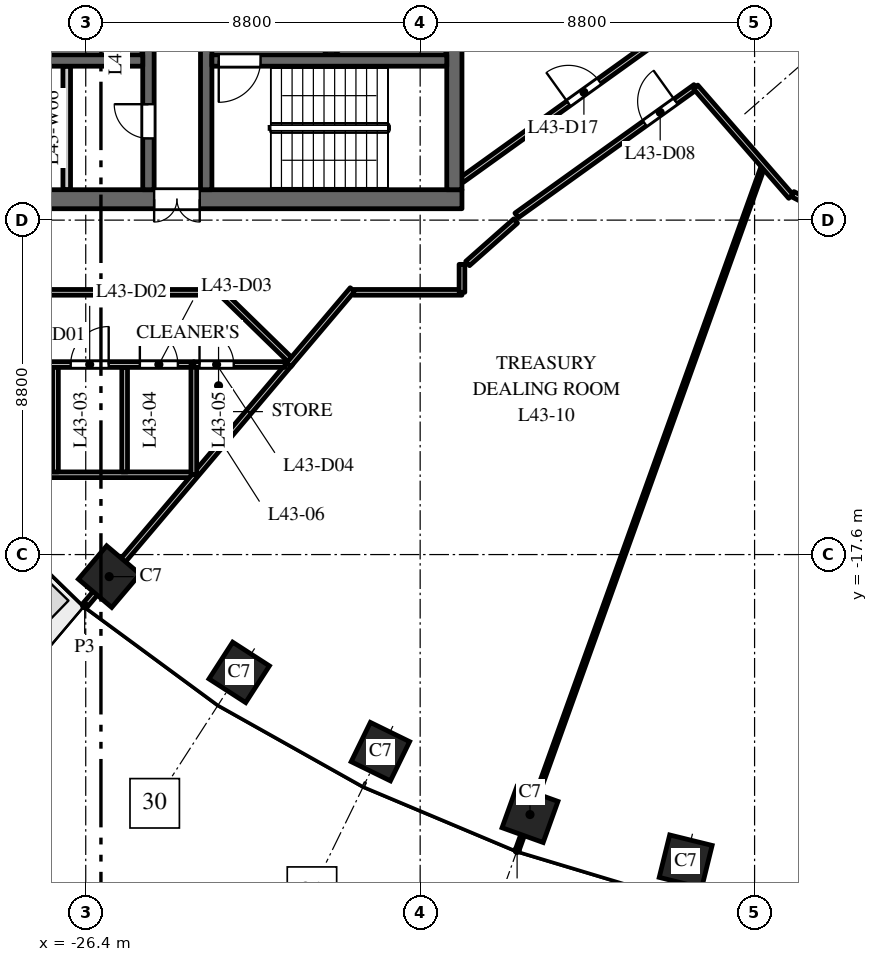
"""IFC4 building model, lengths in metres.
Left out: names, types, materials, properties, quantities, classifications, styles, units other than length and angle.
Written with IfcOpenShell. Run it as: python <this file> out.ifc"""

import sys

from ifc_helpers import new_model, si_unit, direction, frame, frame_2d, origin, origin_2d, place, context, subcontext, project, spatial, rectangle, extrude, element, fill, save


model = new_model("IFC4")
c1 = context("Model", 3, precision=1e-05, world=origin(), true_north=direction((0.0, 1.0)))
c2 = subcontext(c1, "Body", "Model", "MODEL_VIEW")
j1 = project(units=[si_unit("LENGTHUNIT", "METRE"), si_unit("PLANEANGLEUNIT", "RADIAN")], contexts=[c1])
p1 = place(None, origin())
s1 = spatial("IfcSite", under=j1, at=p1, CompositionType="ELEMENT")
p2 = place(p1, origin())
s2 = spatial("IfcBuilding", under=s1, at=p2, CompositionType="ELEMENT")
p3 = place(p2, frame((0.0, 0.0, 186.0)))
s3 = spatial("IfcBuildingStorey", under=s2, at=p3, CompositionType="ELEMENT", Elevation=186.0)
for number, where, z_axis, x_axis in (
    (1, (-25.783, -18.18, 0.0), (0.0, 0.0, 1.0), (0.763, -0.646, 0.0)),
    (2, (-22.362, -20.7, 0.0), (0.0, 0.0, 1.0), (0.84, -0.542, 0.0)),
    (3, (-18.646, -22.785, 0.0), (0.0, 0.0, 1.0), (0.898, -0.439, 0.0)),
    (4, (-14.709, -24.441, 0.0), (0.0, 0.0, 1.0), (0.941, -0.338, 0.0)),
    (5, (-10.613, -25.674, 0.0), (0.0, 0.0, 1.0), (0.971, -0.24, 0.0)),
):
    element("IfcColumn", number, at=place(p3, frame(where, z_axis=z_axis, x_axis=x_axis)), inside=s3, PredefinedType="COLUMN", context=c2, shape_type="SweptSolid", body=[
        extrude(rectangle(XDim=1.15, YDim=1.15, at=origin_2d()), origin(), (0.0, 0.0, 1.0), 4.0),
    ])
p4 = place(p3, frame((-16.5, -8.25, 0.0), z_axis=(0.0, 0.0, 1.0), x_axis=(-1.0, 0.0, 0.0)))
e6 = element("IfcWall", 6, at=p4, inside=s3, PredefinedType="SHEAR", context=c2, shape_type="SweptSolid", body=[
    extrude(rectangle(XDim=15.0, YDim=0.5, at=frame_2d((7.5, 0.0))), origin(), (0.0, 0.0, 1.0), 3.7),
])
p5 = place(p4, frame((6.9, 0.0, 0.0)))
e7 = element("IfcOpeningElement", 7, at=p5, cuts=e6, PredefinedType="OPENING", context=c2, shape_type="SweptSolid", body=[
    extrude(rectangle(XDim=1.2, YDim=2.1, at=frame_2d((0.6, 1.05))), frame((0.0, 0.26, 0.0), z_axis=(0.0, -1.0, 0.0), x_axis=(1.0, 0.0, 0.0)), (0.0, 0.0, 1.0), 0.52),
])
p6 = place(p4, frame((12.05, 0.0, 0.0)))
e8 = element("IfcOpeningElement", 8, at=p6, cuts=e6, PredefinedType="OPENING", context=c2, shape_type="SweptSolid", body=[
    extrude(rectangle(XDim=0.9, YDim=2.1, at=frame_2d((0.45, 1.05))), frame((0.0, 0.26, 0.0), z_axis=(0.0, -1.0, 0.0), x_axis=(1.0, 0.0, 0.0)), (0.0, 0.0, 1.0), 0.52),
])
p7 = place(p3, frame((-19.95, -4.45, 0.0), z_axis=(0.0, 0.0, 1.0), x_axis=(0.0, 1.0, 0.0)))
e9 = element("IfcWall", 9, at=p7, inside=s3, PredefinedType="SHEAR", context=c2, shape_type="SweptSolid", body=[
    extrude(rectangle(XDim=8.9, YDim=0.3, at=frame_2d((4.45, 0.0))), origin(), (0.0, 0.0, 1.0), 3.7),
])
p8 = place(p7, frame((0.775, 0.0, 0.0)))
e10 = element("IfcOpeningElement", 10, at=p8, cuts=e9, PredefinedType="OPENING", context=c2, shape_type="SweptSolid", body=[
    extrude(rectangle(XDim=1.2, YDim=2.1, at=frame_2d((0.6, 1.05))), frame((0.0, 0.16, 0.0), z_axis=(0.0, -1.0, 0.0), x_axis=(1.0, 0.0, 0.0)), (0.0, 0.0, 1.0), 0.32),
])
p9 = place(p7, frame((7.25, 0.0, 0.0)))
e11 = element("IfcOpeningElement", 11, at=p9, cuts=e9, PredefinedType="OPENING", context=c2, shape_type="SweptSolid", body=[
    extrude(rectangle(XDim=1.1, YDim=2.1, at=frame_2d((0.55, 1.05))), frame((0.0, 0.16, 0.0), z_axis=(0.0, -1.0, 0.0), x_axis=(1.0, 0.0, 0.0)), (0.0, 0.0, 1.0), 0.32),
])
p10 = place(p3, frame((-24.75, -8.0, 0.0), z_axis=(0.0, 0.0, 1.0), x_axis=(0.0, 1.0, 0.0)))
e12 = element("IfcWall", 12, at=p10, inside=s3, PredefinedType="SHEAR", context=c2, shape_type="SweptSolid", body=[
    extrude(rectangle(XDim=16.0, YDim=0.3, at=frame_2d((8.0, 0.0))), origin(), (0.0, 0.0, 1.0), 3.7),
])
p11 = place(p10, frame((4.425, 0.0, 0.0)))
e13 = element("IfcOpeningElement", 13, at=p11, cuts=e12, PredefinedType="OPENING", context=c2, shape_type="SweptSolid", body=[
    extrude(rectangle(XDim=1.1, YDim=2.1, at=frame_2d((0.55, 1.05))), frame((0.0, 0.16, 0.0), z_axis=(0.0, -1.0, 0.0), x_axis=(1.0, 0.0, 0.0)), (0.0, 0.0, 1.0), 0.32),
])
p12 = place(p10, frame((7.45, 0.0, 0.0)))
e14 = element("IfcOpeningElement", 14, at=p12, cuts=e12, PredefinedType="OPENING", context=c2, shape_type="SweptSolid", body=[
    extrude(rectangle(XDim=1.1, YDim=2.1, at=frame_2d((0.55, 1.05))), frame((0.0, 0.16, 0.0), z_axis=(0.0, -1.0, 0.0), x_axis=(1.0, 0.0, 0.0)), (0.0, 0.0, 1.0), 0.32),
])
p13 = place(p10, frame((10.475, 0.0, 0.0)))
e15 = element("IfcOpeningElement", 15, at=p13, cuts=e12, PredefinedType="OPENING", context=c2, shape_type="SweptSolid", body=[
    extrude(rectangle(XDim=1.1, YDim=2.1, at=frame_2d((0.55, 1.05))), frame((0.0, 0.16, 0.0), z_axis=(0.0, -1.0, 0.0), x_axis=(1.0, 0.0, 0.0)), (0.0, 0.0, 1.0), 0.32),
])
p14 = place(p10, frame((13.75, 0.0, 0.0)))
e16 = element("IfcOpeningElement", 16, at=p14, cuts=e12, PredefinedType="OPENING", context=c2, shape_type="SweptSolid", body=[
    extrude(rectangle(XDim=0.9, YDim=2.1, at=frame_2d((0.45, 1.05))), frame((0.0, 0.16, 0.0), z_axis=(0.0, -1.0, 0.0), x_axis=(1.0, 0.0, 0.0)), (0.0, 0.0, 1.0), 0.32),
])
p15 = place(p10, frame((1.35, 0.0, 0.0)))
e17 = element("IfcOpeningElement", 17, at=p15, cuts=e12, PredefinedType="OPENING", context=c2, shape_type="SweptSolid", body=[
    extrude(rectangle(XDim=0.9, YDim=2.1, at=frame_2d((0.45, 1.05))), frame((0.0, 0.16, 0.0), z_axis=(0.0, -1.0, 0.0), x_axis=(1.0, 0.0, 0.0)), (0.0, 0.0, 1.0), 0.32),
])
p16 = place(p3, frame((-16.7, -8.0, 0.0), z_axis=(0.0, 0.0, 1.0), x_axis=(0.0, 1.0, 0.0)))
e18 = element("IfcWall", 18, at=p16, inside=s3, PredefinedType="SHEAR", context=c2, shape_type="SweptSolid", body=[
    extrude(rectangle(XDim=16.0, YDim=0.4, at=frame_2d((8.0, 0.0))), origin(), (0.0, 0.0, 1.0), 3.7),
])
p17 = place(p3, frame((-26.9, -8.0, 0.0), z_axis=(0.0, 0.0, 1.0), x_axis=(0.0, 1.0, 0.0)))
e19 = element("IfcWall", 19, at=p17, inside=s3, PredefinedType="PARTITIONING", context=c2, shape_type="SweptSolid", body=[
    extrude(rectangle(XDim=3.25, YDim=0.2, at=frame_2d((1.625, 0.0))), origin(), (0.0, 0.0, 1.0), 3.7),
])
p18 = place(p3, frame((-24.9, -4.6, 0.0), z_axis=(0.0, 0.0, 1.0), x_axis=(-1.0, 0.0, 0.0)))
e20 = element("IfcWall", 20, at=p18, inside=s3, PredefinedType="SHEAR", context=c2, shape_type="SweptSolid", body=[
    extrude(rectangle(XDim=6.1, YDim=0.3, at=frame_2d((3.05, 0.0))), origin(), (0.0, 0.0, 1.0), 3.7),
])
p19 = place(p3, frame((-23.23, -8.0, 0.0), z_axis=(0.0, 0.0, 1.0), x_axis=(0.0, 1.0, 0.0)))
e21 = element("IfcWall", 21, at=p19, inside=s3, PredefinedType="SHEAR", context=c2, shape_type="SweptSolid", body=[
    extrude(rectangle(XDim=7.875, YDim=0.3, at=frame_2d((3.938, 0.0))), origin(), (0.0, 0.0, 1.0), 3.7),
])
p20 = place(p19, frame((5.15, 0.0, 0.0)))
e22 = element("IfcOpeningElement", 22, at=p20, cuts=e21, PredefinedType="OPENING", context=c2, shape_type="SweptSolid", body=[
    extrude(rectangle(XDim=1.1, YDim=2.1, at=frame_2d((0.55, 1.05))), frame((0.0, 0.16, 0.0), z_axis=(0.0, -1.0, 0.0), x_axis=(1.0, 0.0, 0.0)), (0.0, 0.0, 1.0), 0.32),
])
p21 = place(p3, frame((-16.9, -4.6, 0.0), z_axis=(0.0, 0.0, 1.0), x_axis=(-1.0, 0.0, 0.0)))
e23 = element("IfcWall", 23, at=p21, inside=s3, PredefinedType="SHEAR", context=c2, shape_type="SweptSolid", body=[
    extrude(rectangle(XDim=6.18, YDim=0.3, at=frame_2d((3.09, 0.0))), origin(), (0.0, 0.0, 1.0), 3.7),
])
p22 = place(p21, frame((4.9, 0.0, 0.0)))
e24 = element("IfcOpeningElement", 24, at=p22, cuts=e23, PredefinedType="OPENING", context=c2, shape_type="SweptSolid", body=[
    extrude(rectangle(XDim=1.1, YDim=2.1, at=frame_2d((0.55, 1.05))), frame((0.0, 0.16, 0.0), z_axis=(0.0, -1.0, 0.0), x_axis=(1.0, 0.0, 0.0)), (0.0, 0.0, 1.0), 0.32),
])
p23 = place(p3, frame((-31.5, -10.7, 0.0), z_axis=(0.0, 0.0, 1.0), x_axis=(1.0, 0.0, 0.0)))
e25 = element("IfcWall", 25, at=p23, inside=s3, PredefinedType="PARTITIONING", context=c2, shape_type="SweptSolid", body=[
    extrude(rectangle(XDim=8.762, YDim=0.15, at=frame_2d((4.381, 0.0))), origin(), (0.0, 0.0, 1.0), 3.1),
])
p24 = place(p3, frame((-29.016, -12.6, 0.0), z_axis=(0.0, 0.0, 1.0), x_axis=(1.0, 0.0, 0.0)))
e26 = element("IfcWall", 26, at=p24, inside=s3, PredefinedType="PARTITIONING", context=c2, shape_type="SweptSolid", body=[
    extrude(rectangle(XDim=5.46, YDim=0.15, at=frame_2d((2.73, 0.0))), origin(), (0.0, 0.0, 1.0), 3.7),
])
p25 = place(p24, frame((0.4, 0.0, 0.0)))
e27 = element("IfcOpeningElement", 27, at=p25, cuts=e26, PredefinedType="OPENING", context=c2, shape_type="SweptSolid", body=[
    extrude(rectangle(XDim=1.0, YDim=2.1, at=frame_2d((0.5, 1.05))), frame((0.0, 0.085, 0.0), z_axis=(0.0, -1.0, 0.0), x_axis=(1.0, 0.0, 0.0)), (0.0, 0.0, 1.0), 0.17),
])
p26 = place(p24, frame((2.22, 0.0, 0.0)))
e28 = element("IfcOpeningElement", 28, at=p26, cuts=e26, PredefinedType="OPENING", context=c2, shape_type="SweptSolid", body=[
    extrude(rectangle(XDim=1.0, YDim=2.1, at=frame_2d((0.5, 1.05))), frame((0.0, 0.085, 0.0), z_axis=(0.0, -1.0, 0.0), x_axis=(1.0, 0.0, 0.0)), (0.0, 0.0, 1.0), 0.17),
])
p27 = place(p24, frame((4.04, 0.0, 0.0)))
e29 = element("IfcOpeningElement", 29, at=p27, cuts=e26, PredefinedType="OPENING", context=c2, shape_type="SweptSolid", body=[
    extrude(rectangle(XDim=1.0, YDim=2.1, at=frame_2d((0.5, 1.05))), frame((0.0, 0.085, 0.0), z_axis=(0.0, -1.0, 0.0), x_axis=(1.0, 0.0, 0.0)), (0.0, 0.0, 1.0), 0.17),
])
p28 = place(p3, frame((-29.012, -15.5, 0.0), z_axis=(0.0, 0.0, 1.0), x_axis=(1.0, 0.0, 0.0)))
e30 = element("IfcWall", 30, at=p28, inside=s3, PredefinedType="PARTITIONING", context=c2, shape_type="SweptSolid", body=[
    extrude(rectangle(XDim=5.456, YDim=0.15, at=frame_2d((2.728, 0.0))), origin(), (0.0, 0.0, 1.0), 2.9),
])
p29 = place(p3, frame((-27.196, -15.425, 0.0), z_axis=(0.0, 0.0, 1.0), x_axis=(0.0, 1.0, 0.0)))
e31 = element("IfcWall", 31, at=p29, inside=s3, PredefinedType="PARTITIONING", context=c2, shape_type="SweptSolid", body=[
    extrude(rectangle(XDim=2.75, YDim=0.15, at=frame_2d((1.375, 0.0))), origin(), (0.0, 0.0, 1.0), 3.7),
])
p30 = place(p3, frame((-26.428, -18.946, 0.0), z_axis=(0.0, 0.0, 1.0), x_axis=(0.646259235329, 0.763117946816, 0.0)))
e32 = element("IfcWall", 32, at=p30, inside=s3, PredefinedType="PARTITIONING", context=c2, shape_type="SweptSolid", body=[
    extrude(rectangle(XDim=8.388, YDim=0.15, at=frame_2d((4.194, 0.0))), origin(), (0.0, 0.0, 1.0), 2.75),
])
p31 = place(p3, frame((-25.376, -15.425, 0.0), z_axis=(0.0, 0.0, 1.0), x_axis=(0.0, 1.0, 0.0)))
e33 = element("IfcWall", 33, at=p31, inside=s3, PredefinedType="PARTITIONING", context=c2, shape_type="SweptSolid", body=[
    extrude(rectangle(XDim=2.75, YDim=0.15, at=frame_2d((1.375, 0.0))), origin(), (0.0, 0.0, 1.0), 3.7),
])
p32 = place(p3, frame((-23.556, -15.5, 0.0), z_axis=(0.0, 0.0, 1.0), x_axis=(0.0, 1.0, 0.0)))
e34 = element("IfcWall", 34, at=p32, inside=s3, PredefinedType="PARTITIONING", context=c2, shape_type="SweptSolid", body=[
    extrude(rectangle(XDim=2.9, YDim=0.15, at=frame_2d((1.45, 0.0))), origin(), (0.0, 0.0, 1.0), 3.7),
])
p33 = place(p3, frame((-23.556, -12.6, 0.0), z_axis=(0.0, 0.0, 1.0), x_axis=(1.0, 0.0, 0.0)))
e35 = element("IfcWall", 35, at=p33, inside=s3, PredefinedType="PARTITIONING", context=c2, shape_type="SweptSolid", body=[
    extrude(rectangle(XDim=2.4, YDim=0.15, at=frame_2d((1.2, 0.0))), origin(), (0.0, 0.0, 1.0), 3.7),
])
p34 = place(p33, frame((0.15, 0.0, 0.0)))
e36 = element("IfcOpeningElement", 36, at=p34, cuts=e35, PredefinedType="OPENING", context=c2, shape_type="SweptSolid", body=[
    extrude(rectangle(XDim=0.9, YDim=2.1, at=frame_2d((0.45, 1.05))), frame((0.0, 0.085, 0.0), z_axis=(0.0, -1.0, 0.0), x_axis=(1.0, 0.0, 0.0)), (0.0, 0.0, 1.0), 0.17),
])
p35 = place(p3, frame((-22.765, -10.778, 0.0), z_axis=(0.0, 0.0, 1.0), x_axis=(0.716199777284, -0.69789532096, 0.0)))
e37 = element("IfcWall", 37, at=p35, inside=s3, PredefinedType="PARTITIONING", context=c2, shape_type="SweptSolid", body=[
    extrude(rectangle(XDim=2.414, YDim=0.15, at=frame_2d((1.207, 0.0))), origin(), (0.0, 0.0, 1.0), 3.7),
])
p36 = place(p3, frame((-21.058, -12.605, 0.0), z_axis=(0.0, 0.0, 1.0), x_axis=(0.646427819344, 0.762975146632, 0.0)))
e38 = element("IfcWall", 38, at=p36, inside=s3, PredefinedType="PARTITIONING", context=c2, shape_type="SweptSolid", body=[
    extrude(rectangle(XDim=2.591, YDim=0.15, at=frame_2d((1.296, 0.0))), origin(), (0.0, 0.0, 1.0), 3.7),
])
p37 = place(p3, frame((-19.347, -10.7, 0.0), z_axis=(0.0, 0.0, 1.0), x_axis=(1.0, 0.0, 0.0)))
e39 = element("IfcWall", 39, at=p37, inside=s3, PredefinedType="PARTITIONING", context=c2, shape_type="SweptSolid", body=[
    extrude(rectangle(XDim=2.847, YDim=0.15, at=frame_2d((1.423, 0.0))), origin(), (0.0, 0.0, 1.0), 3.7),
])
p38 = place(p3, frame((-16.5, -10.7, 0.0), z_axis=(0.0, 0.0, 1.0), x_axis=(0.0, 1.0, 0.0)))
e40 = element("IfcWall", 40, at=p38, inside=s3, PredefinedType="PARTITIONING", context=c2, shape_type="SweptSolid", body=[
    extrude(rectangle(XDim=0.736, YDim=0.15, at=frame_2d((0.368, 0.0))), origin(), (0.0, 0.0, 1.0), 3.7),
])
p39 = place(p3, frame((-16.5, -7.739, 0.0), z_axis=(0.0, 0.0, 1.0), x_axis=(0.812415179651, 0.583079390712, 0.0)))
e41 = element("IfcWall", 41, at=p39, inside=s3, PredefinedType="PARTITIONING", context=c2, shape_type="SweptSolid", body=[
    extrude(rectangle(XDim=6.68, YDim=0.15, at=frame_2d((3.34, 0.0))), origin(), (0.0, 0.0, 1.0), 3.7),
])
p40 = place(p39, frame((3.45, 0.0, 0.0)))
e42 = element("IfcOpeningElement", 42, at=p40, cuts=e41, PredefinedType="OPENING", context=c2, shape_type="SweptSolid", body=[
    extrude(rectangle(XDim=1.0, YDim=2.1, at=frame_2d((0.5, 1.05))), frame((0.0, 0.085, 0.0), z_axis=(0.0, -1.0, 0.0), x_axis=(1.0, 0.0, 0.0)), (0.0, 0.0, 1.0), 0.17),
])
p41 = place(p3, frame((-15.062, -8.676, 0.0), z_axis=(0.0, 0.0, 1.0), x_axis=(0.812494026232, 0.582969516645, 0.0)))
e43 = element("IfcWall", 43, at=p41, inside=s3, PredefinedType="PARTITIONING", context=c2, shape_type="SweptSolid", body=[
    extrude(rectangle(XDim=5.798, YDim=0.15, at=frame_2d((2.899, 0.0))), origin(), (0.0, 0.0, 1.0), 3.7),
])
p42 = place(p41, frame((4.15, 0.0, 0.0)))
e44 = element("IfcOpeningElement", 44, at=p42, cuts=e43, PredefinedType="OPENING", context=c2, shape_type="SweptSolid", body=[
    extrude(rectangle(XDim=1.0, YDim=2.1, at=frame_2d((0.5, 1.05))), frame((0.0, 0.085, 0.0), z_axis=(0.0, -1.0, 0.0), x_axis=(1.0, 0.0, 0.0)), (0.0, 0.0, 1.0), 0.17),
])
p43 = place(p3, frame((-15.049, -25.383, 0.0), z_axis=(0.0, 0.0, 1.0), x_axis=(0.338407677895, 0.940999598056, 0.0)))
e45 = element("IfcWall", 45, at=p43, inside=s3, PredefinedType="PARTITIONING", context=c2, shape_type="SweptSolid", body=[
    extrude(rectangle(XDim=19.078, YDim=0.1, at=frame_2d((9.539, 0.0))), origin(), (0.0, 0.0, 1.0), 2.85),
])
p44 = place(p3, frame((-10.351, -5.296, 0.0), z_axis=(0.0, 0.0, 1.0), x_axis=(0.656297424411, -0.754502280124, 0.0)))
e46 = element("IfcWall", 46, at=p44, inside=s3, PredefinedType="PARTITIONING", context=c2, shape_type="SweptSolid", body=[
    extrude(rectangle(XDim=3.819, YDim=0.15, at=frame_2d((1.909, 0.0))), origin(), (0.0, 0.0, 1.0), 2.75),
])
p45 = place(p3, frame((-7.798, -8.116, 0.0), z_axis=(0.0, 0.0, 1.0), x_axis=(0.889319313061, -0.457286736542, 0.0)))
e47 = element("IfcWall", 47, at=p45, inside=s3, PredefinedType="PARTITIONING", context=c2, shape_type="SweptSolid", body=[
    extrude(rectangle(XDim=4.321, YDim=0.15, at=frame_2d((2.161, 0.0))), origin(), (0.0, 0.0, 1.0), 2.85),
])
p46 = place(p45, frame((2.448, 0.0, 0.0)))
e48 = element("IfcOpeningElement", 48, at=p46, cuts=e47, PredefinedType="OPENING", context=c2, shape_type="SweptSolid", body=[
    extrude(rectangle(XDim=1.0, YDim=2.1, at=frame_2d((0.5, 1.05))), frame((0.0, 0.085, 0.0), z_axis=(0.0, -1.0, 0.0), x_axis=(1.0, 0.0, 0.0)), (0.0, 0.0, 1.0), 0.17),
])
p47 = place(p3, frame((-15.088, -8.824, 0.0), z_axis=(0.0, 0.0, 1.0), x_axis=(-0.749107006374, -0.662449011624, 0.0)))
e49 = element("IfcWall", 49, at=p47, inside=s3, PredefinedType="PARTITIONING", context=c2, shape_type="SweptSolid", body=[
    extrude(rectangle(XDim=1.688, YDim=0.15, at=frame_2d((0.844, 0.0))), origin(), (0.0, 0.0, 1.0), 3.7),
])
p48 = place(p22, origin())
e50 = element("IfcDoor", 50, at=p48, inside=s3, OperationType="SINGLE_SWING_LEFT", PredefinedType="DOOR", context=c2, shape_type="SweptSolid", body=[
    extrude(rectangle(XDim=1.1, YDim=2.1, at=frame_2d((0.55, 1.05))), frame((0.0, 0.025, 0.0), z_axis=(0.0, -1.0, 0.0), x_axis=(1.0, 0.0, 0.0)), (0.0, 0.0, 1.0), 0.05),
])
fill(e24, e50)
p49 = place(p5, origin())
e51 = element("IfcDoor", 51, at=p49, inside=s3, OperationType="DOUBLE_DOOR_DOUBLE_SWING", PredefinedType="DOOR", context=c2, shape_type="SweptSolid", body=[
    extrude(rectangle(XDim=1.2, YDim=2.1, at=frame_2d((0.6, 1.05))), frame((0.0, 0.025, 0.0), z_axis=(0.0, -1.0, 0.0), x_axis=(1.0, 0.0, 0.0)), (0.0, 0.0, 1.0), 0.05),
])
fill(e7, e51)
p50 = place(p15, origin())
e52 = element("IfcDoor", 52, at=p50, inside=s3, OperationType="SINGLE_SWING_LEFT", PredefinedType="DOOR", context=c2, shape_type="SweptSolid", body=[
    extrude(rectangle(XDim=0.9, YDim=2.1, at=frame_2d((0.45, 1.05))), frame((0.0, 0.025, 0.0), z_axis=(0.0, -1.0, 0.0), x_axis=(1.0, 0.0, 0.0)), (0.0, 0.0, 1.0), 0.05),
])
fill(e17, e52)
p51 = place(p26, origin())
e53 = element("IfcDoor", 53, at=p51, inside=s3, OperationType="SINGLE_SWING_RIGHT", PredefinedType="DOOR", context=c2, shape_type="SweptSolid", body=[
    extrude(rectangle(XDim=1.0, YDim=2.1, at=frame_2d((0.5, 1.05))), frame((0.0, 0.025, 0.0), z_axis=(0.0, -1.0, 0.0), x_axis=(1.0, 0.0, 0.0)), (0.0, 0.0, 1.0), 0.05),
])
fill(e28, e53)
p52 = place(p27, origin())
e54 = element("IfcDoor", 54, at=p52, inside=s3, OperationType="SINGLE_SWING_LEFT", PredefinedType="DOOR", context=c2, shape_type="SweptSolid", body=[
    extrude(rectangle(XDim=1.0, YDim=2.1, at=frame_2d((0.5, 1.05))), frame((0.0, 0.025, 0.0), z_axis=(0.0, -1.0, 0.0), x_axis=(1.0, 0.0, 0.0)), (0.0, 0.0, 1.0), 0.05),
])
fill(e29, e54)
p53 = place(p34, origin())
e55 = element("IfcDoor", 55, at=p53, inside=s3, OperationType="SINGLE_SWING_LEFT", PredefinedType="DOOR", context=c2, shape_type="SweptSolid", body=[
    extrude(rectangle(XDim=0.9, YDim=2.1, at=frame_2d((0.45, 1.05))), frame((0.0, 0.025, 0.0), z_axis=(0.0, -1.0, 0.0), x_axis=(1.0, 0.0, 0.0)), (0.0, 0.0, 1.0), 0.05),
])
fill(e36, e55)
p54 = place(p42, origin())
e56 = element("IfcDoor", 56, at=p54, inside=s3, OperationType="SINGLE_SWING_RIGHT", PredefinedType="DOOR", context=c2, shape_type="SweptSolid", body=[
    extrude(rectangle(XDim=1.0, YDim=2.1, at=frame_2d((0.5, 1.05))), frame((0.0, 0.025, 0.0), z_axis=(0.0, -1.0, 0.0), x_axis=(1.0, 0.0, 0.0)), (0.0, 0.0, 1.0), 0.05),
])
fill(e44, e56)
p55 = place(p40, origin())
e57 = element("IfcDoor", 57, at=p55, inside=s3, OperationType="SINGLE_SWING_LEFT", PredefinedType="DOOR", context=c2, shape_type="SweptSolid", body=[
    extrude(rectangle(XDim=1.0, YDim=2.1, at=frame_2d((0.5, 1.05))), frame((0.0, 0.025, 0.0), z_axis=(0.0, -1.0, 0.0), x_axis=(1.0, 0.0, 0.0)), (0.0, 0.0, 1.0), 0.05),
])
fill(e42, e57)
save(model, sys.argv[1])
